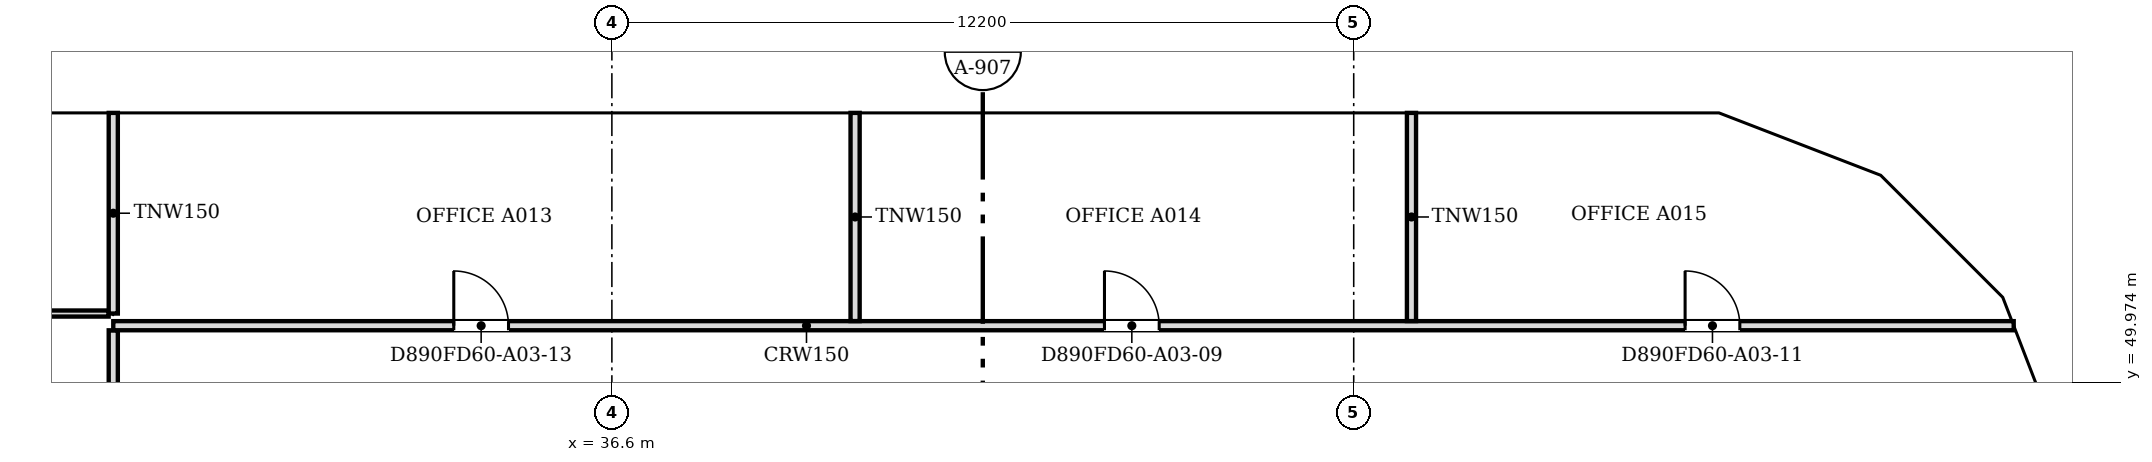
"""IFC4 building model, lengths in metres.
Left out: names, types, materials, properties, quantities, classifications, styles, units other than length and angle.
Written with IfcOpenShell. Run it as: python <this file> out.ifc"""

import sys

from ifc_helpers import new_model, si_unit, direction, frame, frame_2d, origin, place, context, subcontext, project, spatial, polyline, rectangle, outline, extrude, faceted_brep, source, transform, mapped, element, fill, save


model = new_model("IFC4")
c1 = context("Model", 3, precision=1e-05, world=origin(), true_north=direction((0.0, 1.0)))
c2 = subcontext(c1, "Body", "Model", "MODEL_VIEW")
j1 = project(units=[si_unit("LENGTHUNIT", "METRE"), si_unit("PLANEANGLEUNIT", "RADIAN")], contexts=[c1])
p1 = place(None, origin())
s1 = spatial("IfcSite", under=j1, at=p1, CompositionType="ELEMENT")
p2 = place(p1, origin())
s2 = spatial("IfcBuilding", under=s1, at=p2, CompositionType="ELEMENT")
p3 = place(p2, frame((0.0, 0.0, 37.2)))
s3 = spatial("IfcBuildingStorey", under=s2, at=p3, CompositionType="ELEMENT", Elevation=37.2)
m1 = source(origin(), c2, "Body", "Brep", [
    faceted_brep([(0.047, -0.25, 0.0), (2.997, -0.25, 3.8), (0.047, -0.25, 7.6), (0.0, -0.25, 7.541), (0.0, -0.25, 0.059), (0.093, 0.25, 7.54), (2.944, 0.25, 3.868), (2.944, 0.25, 3.732), (0.093, 0.25, 0.06), (2.997, 0.0, 3.8), (0.047, 0.0, 0.0), (0.047, 0.0, 7.6)], [[[0, 1, 2, 3, 4]], [[5, 6, 7, 8]], [[8, 7, 9, 1, 0, 10]], [[6, 5, 11, 2, 1, 9]], [[3, 2, 11]], [[10, 0, 4]], [[8, 10, 4, 3, 11, 5]], [[9, 7, 6]]]),
])
p4 = place(p3, frame((60.767, 48.71, -3.8), z_axis=(0.0, 0.0, 1.0), x_axis=(-0.359901446078, 0.932990326376, 0.0)))
e1 = element("IfcWall", 1, at=p4, inside=s3, PredefinedType="SOLIDWALL", context=c2, shape_type="MappedRepresentation", body=[
    mapped(m1, transform((0.0, 0.0, 0.0), scale=1.0)),
])
m2 = source(origin(), c2, "Body", "SweptSolid", [
    extrude(outline(polyline([(0.247, 0.665), (2.681, 3.8), (0.247, 6.935), (0.247, 0.665)])), frame((0.0, 0.26, 0.0), z_axis=(0.0, -1.0, 0.0), x_axis=(1.0, 0.0, 0.0)), (0.0, 0.0, 1.0), 0.52),
])
p5 = place(p4, origin())
e2 = element("IfcOpeningElement", 2, at=p5, cuts=e1, PredefinedType="OPENING", context=c2, shape_type="MappedRepresentation", body=[
    mapped(m2, transform((0.0, 0.0, 0.0), scale=1.0)),
])
m3 = source(origin(), c2, "Body", "Brep", [
    faceted_brep([(2.944, -0.25, 0.0), (2.997, -0.25, 0.068), (2.997, -0.25, 7.532), (2.944, -0.25, 7.6), (0.0, -0.25, 3.8), (0.053, 0.25, 3.868), (2.891, 0.25, 7.532), (2.891, 0.25, 0.068), (0.053, 0.25, 3.732), (2.944, 0.0, 0.0), (2.944, 0.0, 7.6), (0.0, 0.0, 3.8)], [[[0, 1, 2, 3, 4]], [[5, 6, 7, 8]], [[1, 0, 9]], [[10, 3, 2]], [[6, 5, 11, 4, 3, 10]], [[8, 7, 9, 0, 4, 11]], [[8, 11, 5]], [[1, 9, 7, 6, 10, 2]]]),
])
p6 = place(p3, frame((59.688, 51.506, -3.8), z_axis=(0.0, 0.0, 1.0), x_axis=(-0.707106781187, 0.707106781187, 0.0)))
e3 = element("IfcWall", 3, at=p6, inside=s3, PredefinedType="SOLIDWALL", context=c2, shape_type="MappedRepresentation", body=[
    mapped(m3, transform((0.0, 0.0, 0.0), scale=1.0)),
])
m4 = source(origin(), c2, "Body", "SweptSolid", [
    extrude(outline(polyline([(2.744, 6.934), (0.316, 3.8), (2.744, 0.667), (2.744, 6.934)])), frame((0.0, 0.26, 0.0), z_axis=(0.0, -1.0, 0.0), x_axis=(1.0, 0.0, 0.0)), (0.0, 0.0, 1.0), 0.52),
])
p7 = place(p6, origin())
e4 = element("IfcOpeningElement", 4, at=p7, cuts=e3, PredefinedType="OPENING", context=c2, shape_type="MappedRepresentation", body=[
    mapped(m4, transform((0.0, 0.0, 0.0), scale=1.0)),
])
m5 = source(origin(), c2, "Body", "Brep", [
    faceted_brep([(0.053, -0.25, 0.0), (3.003, -0.25, 3.8), (0.053, -0.25, 7.6), (0.0, -0.25, 7.532), (0.0, -0.25, 0.068), (0.106, 0.25, 7.532), (2.957, 0.25, 3.86), (2.957, 0.25, 3.74), (0.106, 0.25, 0.068), (3.003, 0.0, 3.8), (0.053, 0.0, 0.0), (0.053, 0.0, 7.6)], [[[0, 1, 2, 3, 4]], [[5, 6, 7, 8]], [[8, 7, 9, 1, 0, 10]], [[6, 5, 11, 2, 1, 9]], [[3, 2, 11]], [[10, 0, 4]], [[8, 10, 4, 3, 11, 5]], [[9, 7, 6]]]),
])
p8 = place(p3, frame((57.656, 53.569, -3.8), z_axis=(0.0, 0.0, 1.0), x_axis=(-0.933007896601, 0.359855894603, 0.0)))
e5 = element("IfcWall", 5, at=p8, inside=s3, PredefinedType="SOLIDWALL", context=c2, shape_type="MappedRepresentation", body=[
    mapped(m5, transform((0.0, 0.0, 0.0), scale=1.0)),
])
m6 = source(origin(), c2, "Body", "SweptSolid", [
    extrude(outline(polyline([(0.253, 0.665), (2.687, 3.8), (0.253, 6.935), (0.253, 0.665)])), frame((0.0, 0.26, 0.0), z_axis=(0.0, -1.0, 0.0), x_axis=(1.0, 0.0, 0.0)), (0.0, 0.0, 1.0), 0.52),
])
p9 = place(p8, origin())
e6 = element("IfcOpeningElement", 6, at=p9, cuts=e5, PredefinedType="OPENING", context=c2, shape_type="MappedRepresentation", body=[
    mapped(m6, transform((0.0, 0.0, 0.0), scale=1.0)),
])
m7 = source(origin(), c2, "Body", "Brep", [
    faceted_brep([(3.003, -0.25, 0.0), (6.053, -0.25, 3.8), (3.003, -0.25, 7.6), (0.0, -0.25, 3.8), (0.047, 0.25, 3.859), (3.003, 0.25, 7.6), (6.053, 0.25, 3.8), (3.003, 0.25, 0.0), (0.047, 0.25, 3.741), (0.0, 0.0, 3.8)], [[[0, 1, 2, 3]], [[4, 5, 6, 7, 8]], [[7, 6, 1, 0]], [[6, 5, 2, 1]], [[5, 4, 9, 3, 2]], [[8, 7, 0, 3, 9]], [[8, 9, 4]]]),
])
p10 = place(p3, frame((54.854, 54.65, -3.8), z_axis=(0.0, 0.0, 1.0), x_axis=(-1.0, 0.0, 0.0)))
e7 = element("IfcWall", 7, at=p10, inside=s3, PredefinedType="SOLIDWALL", context=c2, shape_type="MappedRepresentation", body=[
    mapped(m7, transform((0.0, 0.0, 0.0), scale=1.0)),
])
m8 = source(origin(), c2, "Body", "SweptSolid", [
    extrude(outline(polyline([(3.005, 0.401), (5.733, 3.8), (3.005, 7.199), (0.319, 3.8), (3.005, 0.401)])), frame((0.0, 0.26, 0.0), z_axis=(0.0, -1.0, 0.0), x_axis=(1.0, 0.0, 0.0)), (0.0, 0.0, 1.0), 0.52),
])
p11 = place(p10, origin())
e8 = element("IfcOpeningElement", 8, at=p11, cuts=e7, PredefinedType="OPENING", context=c2, shape_type="MappedRepresentation", body=[
    mapped(m8, transform((0.0, 0.0, 0.0), scale=1.0)),
])
m9 = source(origin(), c2, "Body", "SweptSolid", [
    extrude(outline(polyline([(3.05, 0.0), (6.1, 3.8), (3.05, 7.6), (0.0, 3.8), (3.05, 0.0)])), frame((0.0, 0.25, 0.0), z_axis=(0.0, -1.0, 0.0), x_axis=(1.0, 0.0, 0.0)), (0.0, 0.0, 1.0), 0.5),
])
p12 = place(p3, frame((48.8, 54.65, -3.8), z_axis=(0.0, 0.0, 1.0), x_axis=(-1.0, 0.0, 0.0)))
e9 = element("IfcWall", 9, at=p12, inside=s3, PredefinedType="SOLIDWALL", context=c2, shape_type="MappedRepresentation", body=[
    mapped(m9, transform((0.0, 0.0, 0.0), scale=1.0)),
])
m10 = source(origin(), c2, "Body", "SweptSolid", [
    extrude(outline(polyline([(3.05, 0.399), (5.78, 3.8), (3.05, 7.201), (0.321, 3.8), (3.05, 0.399)])), frame((0.0, 0.26, 0.0), z_axis=(0.0, -1.0, 0.0), x_axis=(1.0, 0.0, 0.0)), (0.0, 0.0, 1.0), 0.52),
])
p13 = place(p12, origin())
e10 = element("IfcOpeningElement", 10, at=p13, cuts=e9, PredefinedType="OPENING", context=c2, shape_type="MappedRepresentation", body=[
    mapped(m10, transform((0.0, 0.0, 0.0), scale=1.0)),
])
m11 = source(origin(), c2, "Body", "Brep", [
    faceted_brep([(3.05, -0.25, 0.0), (6.1, -0.25, 3.8), (6.1, -0.25, 3.8), (3.05, -0.25, 7.6), (0.0, -0.25, 3.8), (0.0, 0.25, 3.8), (3.05, 0.25, 7.6), (6.1, 0.25, 3.8), (6.1, 0.25, 3.8), (3.05, 0.25, 0.0)], [[[0, 1, 2, 3, 4]], [[5, 6, 7, 8, 9]], [[9, 8, 1, 0]], [[7, 6, 3, 2]], [[6, 5, 4, 3]], [[5, 9, 0, 4]], [[1, 8, 7, 2]]]),
])
p14 = place(p3, frame((42.7, 54.65, -3.8), z_axis=(0.0, 0.0, 1.0), x_axis=(-1.0, 0.0, 0.0)))
e11 = element("IfcWall", 11, at=p14, inside=s3, PredefinedType="SOLIDWALL", context=c2, shape_type="MappedRepresentation", body=[
    mapped(m11, transform((0.0, 0.0, 0.0), scale=1.0)),
])
p15 = place(p14, origin())
e12 = element("IfcOpeningElement", 12, at=p15, cuts=e11, PredefinedType="OPENING", context=c2, shape_type="MappedRepresentation", body=[
    mapped(m10, transform((0.0, 0.0, 0.0), scale=1.0)),
])
p16 = place(p3, frame((36.6, 54.65, -3.8), z_axis=(0.0, 0.0, 1.0), x_axis=(-1.0, 0.0, 0.0)))
e13 = element("IfcWall", 13, at=p16, inside=s3, PredefinedType="SOLIDWALL", context=c2, shape_type="MappedRepresentation", body=[
    mapped(m9, transform((0.0, 0.0, 0.0), scale=1.0)),
])
p17 = place(p16, origin())
e14 = element("IfcOpeningElement", 14, at=p17, cuts=e13, PredefinedType="OPENING", context=c2, shape_type="MappedRepresentation", body=[
    mapped(m10, transform((0.0, 0.0, 0.0), scale=1.0)),
])
p18 = place(p3, frame((30.5, 54.65, -3.8), z_axis=(0.0, 0.0, 1.0), x_axis=(-1.0, 0.0, 0.0)))
e15 = element("IfcWall", 15, at=p18, inside=s3, PredefinedType="SOLIDWALL", context=c2, shape_type="MappedRepresentation", body=[
    mapped(m9, transform((0.0, 0.0, 0.0), scale=1.0)),
])
p19 = place(p18, origin())
e16 = element("IfcOpeningElement", 16, at=p19, cuts=e15, PredefinedType="OPENING", context=c2, shape_type="MappedRepresentation", body=[
    mapped(m10, transform((0.0, 0.0, 0.0), scale=1.0)),
])
p20 = place(p2, frame((0.0, 0.0, 41.0)))
s4 = spatial("IfcBuildingStorey", under=s2, at=p20, CompositionType="ELEMENT", Elevation=41.0)
m12 = source(origin(), c2, "Body", "Brep", [
    faceted_brep([(2.95, -0.25, 0.0), (3.003, -0.25, 0.068), (3.003, -0.25, 7.532), (2.95, -0.25, 7.6), (0.0, -0.25, 3.8), (0.047, 0.25, 3.86), (2.898, 0.25, 7.532), (2.898, 0.25, 0.068), (0.047, 0.25, 3.74), (2.95, 0.0, 0.0), (2.95, 0.0, 7.6), (0.0, 0.0, 3.8)], [[[0, 1, 2, 3, 4]], [[5, 6, 7, 8]], [[1, 0, 9]], [[10, 3, 2]], [[6, 5, 11, 4, 3, 10]], [[8, 7, 9, 0, 4, 11]], [[8, 11, 5]], [[1, 9, 7, 6, 10, 2]]]),
])
p21 = place(p20, frame((60.75, 48.753, -3.8), z_axis=(0.0, 0.0, 1.0), x_axis=(-0.35992665181, 0.932980602862, 0.0)))
e17 = element("IfcWall", 17, at=p21, inside=s4, PredefinedType="SOLIDWALL", context=c2, shape_type="MappedRepresentation", body=[
    mapped(m12, transform((0.0, 0.0, 0.0), scale=1.0)),
])
m13 = source(origin(), c2, "Body", "SweptSolid", [
    extrude(outline(polyline([(2.75, 6.935), (0.316, 3.8), (2.75, 0.665), (2.75, 6.935)])), frame((0.0, 0.26, 0.0), z_axis=(0.0, -1.0, 0.0), x_axis=(1.0, 0.0, 0.0)), (0.0, 0.0, 1.0), 0.52),
])
p22 = place(p21, origin())
e18 = element("IfcOpeningElement", 18, at=p22, cuts=e17, PredefinedType="OPENING", context=c2, shape_type="MappedRepresentation", body=[
    mapped(m13, transform((0.0, 0.0, 0.0), scale=1.0)),
])
m14 = source(origin(), c2, "Body", "Brep", [
    faceted_brep([(0.053, -0.25, 0.0), (2.997, -0.25, 3.8), (0.053, -0.25, 7.6), (0.0, -0.25, 7.532), (0.0, -0.25, 0.068), (0.106, 0.25, 7.532), (2.944, 0.25, 3.868), (2.944, 0.25, 3.732), (0.106, 0.25, 0.068), (2.997, 0.0, 3.8), (0.053, 0.0, 0.0), (0.053, 0.0, 7.6)], [[[0, 1, 2, 3, 4]], [[5, 6, 7, 8]], [[8, 7, 9, 1, 0, 10]], [[6, 5, 11, 2, 1, 9]], [[3, 2, 11]], [[10, 0, 4]], [[8, 10, 4, 3, 11, 5]], [[9, 7, 6]]]),
])
p23 = place(p20, frame((59.726, 51.469, -3.8), z_axis=(0.0, 0.0, 1.0), x_axis=(-0.707106781187, 0.707106781187, 0.0)))
e19 = element("IfcWall", 19, at=p23, inside=s4, PredefinedType="SOLIDWALL", context=c2, shape_type="MappedRepresentation", body=[
    mapped(m14, transform((0.0, 0.0, 0.0), scale=1.0)),
])
m15 = source(origin(), c2, "Body", "SweptSolid", [
    extrude(outline(polyline([(0.253, 0.666), (2.681, 3.8), (0.253, 6.934), (0.253, 0.666)])), frame((0.0, 0.26, 0.0), z_axis=(0.0, -1.0, 0.0), x_axis=(1.0, 0.0, 0.0)), (0.0, 0.0, 1.0), 0.52),
])
p24 = place(p23, origin())
e20 = element("IfcOpeningElement", 20, at=p24, cuts=e19, PredefinedType="OPENING", context=c2, shape_type="MappedRepresentation", body=[
    mapped(m15, transform((0.0, 0.0, 0.0), scale=1.0)),
])
m16 = source(origin(), c2, "Body", "Brep", [
    faceted_brep([(2.95, -0.25, 0.0), (2.997, -0.25, 0.059), (2.997, -0.25, 7.541), (2.95, -0.25, 7.6), (0.0, -0.25, 3.8), (0.053, 0.25, 3.868), (2.904, 0.25, 7.54), (2.904, 0.25, 0.06), (0.053, 0.25, 3.732), (2.95, 0.0, 0.0), (2.95, 0.0, 7.6), (0.0, 0.0, 3.8)], [[[0, 1, 2, 3, 4]], [[5, 6, 7, 8]], [[1, 0, 9]], [[10, 3, 2]], [[6, 5, 11, 4, 3, 10]], [[8, 7, 9, 0, 4, 11]], [[8, 11, 5]], [[1, 9, 7, 6, 10, 2]]]),
])
p25 = place(p20, frame((57.606, 53.588, -3.8), z_axis=(0.0, 0.0, 1.0), x_axis=(-0.932990326376, 0.359901446078, 0.0)))
e21 = element("IfcWall", 21, at=p25, inside=s4, PredefinedType="SOLIDWALL", context=c2, shape_type="MappedRepresentation", body=[
    mapped(m16, transform((0.0, 0.0, 0.0), scale=1.0)),
])
p26 = place(p25, origin())
e22 = element("IfcOpeningElement", 22, at=p26, cuts=e21, PredefinedType="OPENING", context=c2, shape_type="MappedRepresentation", body=[
    mapped(m13, transform((0.0, 0.0, 0.0), scale=1.0)),
])
m17 = source(origin(), c2, "Body", "Brep", [
    faceted_brep([(0.047, -0.25, 0.0), (3.05, -0.25, 3.8), (0.047, -0.25, 7.6), (0.0, -0.25, 7.54), (0.0, -0.25, 0.06), (0.093, 0.25, 7.541), (3.05, 0.25, 3.8), (0.093, 0.25, 0.059), (0.047, 0.0, 0.0), (0.047, 0.0, 7.6)], [[[0, 1, 2, 3, 4]], [[5, 6, 7]], [[7, 6, 1, 0, 8]], [[6, 5, 9, 2, 1]], [[3, 2, 9]], [[8, 0, 4]], [[7, 8, 4, 3, 9, 5]]]),
])
p27 = place(p20, frame((54.9, 54.65, -3.8), z_axis=(0.0, 0.0, 1.0), x_axis=(-1.0, 0.0, 0.0)))
e23 = element("IfcWall", 23, at=p27, inside=s4, PredefinedType="SOLIDWALL", context=c2, shape_type="MappedRepresentation", body=[
    mapped(m17, transform((0.0, 0.0, 0.0), scale=1.0)),
])
m18 = source(origin(), c2, "Body", "SweptSolid", [
    extrude(outline(polyline([(0.247, 0.656), (2.731, 3.8), (0.247, 6.944), (0.247, 0.656)])), frame((0.0, 0.26, 0.0), z_axis=(0.0, -1.0, 0.0), x_axis=(1.0, 0.0, 0.0)), (0.0, 0.0, 1.0), 0.52),
])
p28 = place(p27, origin())
e24 = element("IfcOpeningElement", 24, at=p28, cuts=e23, PredefinedType="OPENING", context=c2, shape_type="MappedRepresentation", body=[
    mapped(m18, transform((0.0, 0.0, 0.0), scale=1.0)),
])
p29 = place(p20, frame((51.85, 54.65, -3.8), z_axis=(0.0, 0.0, 1.0), x_axis=(-1.0, 0.0, 0.0)))
e25 = element("IfcWall", 25, at=p29, inside=s4, PredefinedType="SOLIDWALL", context=c2, shape_type="MappedRepresentation", body=[
    mapped(m9, transform((0.0, 0.0, 0.0), scale=1.0)),
])
p30 = place(p29, origin())
e26 = element("IfcOpeningElement", 26, at=p30, cuts=e25, PredefinedType="OPENING", context=c2, shape_type="MappedRepresentation", body=[
    mapped(m10, transform((0.0, 0.0, 0.0), scale=1.0)),
])
p31 = place(p20, frame((45.75, 54.65, -3.8), z_axis=(0.0, 0.0, 1.0), x_axis=(-1.0, 0.0, 0.0)))
e27 = element("IfcWall", 27, at=p31, inside=s4, PredefinedType="SOLIDWALL", context=c2, shape_type="MappedRepresentation", body=[
    mapped(m9, transform((0.0, 0.0, 0.0), scale=1.0)),
])
p32 = place(p31, origin())
e28 = element("IfcOpeningElement", 28, at=p32, cuts=e27, PredefinedType="OPENING", context=c2, shape_type="MappedRepresentation", body=[
    mapped(m10, transform((0.0, 0.0, 0.0), scale=1.0)),
])
p33 = place(p20, frame((39.65, 54.65, -3.8), z_axis=(0.0, 0.0, 1.0), x_axis=(-1.0, 0.0, 0.0)))
e29 = element("IfcWall", 29, at=p33, inside=s4, PredefinedType="SOLIDWALL", context=c2, shape_type="MappedRepresentation", body=[
    mapped(m11, transform((0.0, 0.0, 0.0), scale=1.0)),
])
p34 = place(p33, origin())
e30 = element("IfcOpeningElement", 30, at=p34, cuts=e29, PredefinedType="OPENING", context=c2, shape_type="MappedRepresentation", body=[
    mapped(m10, transform((0.0, 0.0, 0.0), scale=1.0)),
])
p35 = place(p20, frame((33.55, 54.65, -3.8), z_axis=(0.0, 0.0, 1.0), x_axis=(-1.0, 0.0, 0.0)))
e31 = element("IfcWall", 31, at=p35, inside=s4, PredefinedType="SOLIDWALL", context=c2, shape_type="MappedRepresentation", body=[
    mapped(m9, transform((0.0, 0.0, 0.0), scale=1.0)),
])
p36 = place(p35, origin())
e32 = element("IfcOpeningElement", 32, at=p36, cuts=e31, PredefinedType="OPENING", context=c2, shape_type="MappedRepresentation", body=[
    mapped(m10, transform((0.0, 0.0, 0.0), scale=1.0)),
])
p37 = place(p20, frame((27.45, 54.65, -3.8), z_axis=(0.0, 0.0, 1.0), x_axis=(-1.0, 0.0, 0.0)))
e33 = element("IfcWall", 33, at=p37, inside=s4, PredefinedType="SOLIDWALL", context=c2, shape_type="MappedRepresentation", body=[
    mapped(m11, transform((0.0, 0.0, 0.0), scale=1.0)),
])
p38 = place(p37, origin())
e34 = element("IfcOpeningElement", 34, at=p38, cuts=e33, PredefinedType="OPENING", context=c2, shape_type="MappedRepresentation", body=[
    mapped(m10, transform((0.0, 0.0, 0.0), scale=1.0)),
])
p39 = place(p3, frame((28.4, 48.176, 0.0), z_axis=(0.0, 0.0, 1.0), x_axis=(0.0, 1.0, 0.0)))
e35 = element("IfcWall", 35, at=p39, inside=s3, PredefinedType="PARTITIONING", context=c2, shape_type="SweptSolid", body=[
    extrude(rectangle(XDim=2.648, YDim=0.15, at=frame_2d((1.324, 0.0))), origin(), (0.0, 0.0, 1.0), 3.067),
])
p40 = place(p3, frame((28.4, 50.9, 0.0), z_axis=(0.0, 0.0, 1.0), x_axis=(1.0, 0.0, 0.0)))
e36 = element("IfcWall", 36, at=p40, inside=s3, PredefinedType="PARTITIONING", context=c2, shape_type="SweptSolid", body=[
    extrude(rectangle(XDim=31.254, YDim=0.15, at=frame_2d((15.627, 0.0))), origin(), (0.0, 0.0, 1.0), 3.067),
])
m19 = source(origin(), c2, "Body", "SweptSolid", [
    extrude(rectangle(XDim=0.9, YDim=2.1, at=frame_2d((0.45, 1.05))), frame((0.0, 0.085, 0.0), z_axis=(0.0, -1.0, 0.0), x_axis=(1.0, 0.0, 0.0)), (0.0, 0.0, 1.0), 0.17),
])
p41 = place(p40, frame((16.301, 0.0, 0.0)))
e37 = element("IfcOpeningElement", 37, at=p41, cuts=e36, PredefinedType="OPENING", context=c2, shape_type="MappedRepresentation", body=[
    mapped(m19, transform((0.0, 0.0, 0.0), scale=1.0)),
])
p42 = place(p40, frame((25.85, 0.0, 0.0)))
e38 = element("IfcOpeningElement", 38, at=p42, cuts=e36, PredefinedType="OPENING", context=c2, shape_type="MappedRepresentation", body=[
    mapped(m19, transform((0.0, 0.0, 0.0), scale=1.0)),
])
p43 = place(p40, frame((5.6, 0.0, 0.0)))
e39 = element("IfcOpeningElement", 39, at=p43, cuts=e36, PredefinedType="OPENING", context=c2, shape_type="MappedRepresentation", body=[
    mapped(m19, transform((0.0, 0.0, 0.0), scale=1.0)),
])
for number, where, z_axis, x_axis in (
    (40, (40.6, 50.976, 0.0), (0.0, 0.0, 1.0), (0.0, 1.0, 0.0)),
    (41, (49.75, 50.976, 0.0), (0.0, 0.0, 1.0), (0.0, 1.0, 0.0)),
):
    element("IfcWall", number, at=place(p3, frame(where, z_axis=z_axis, x_axis=x_axis)), inside=s3, PredefinedType="PARTITIONING", context=c2, shape_type="SweptSolid", body=[
        extrude(rectangle(XDim=3.424, YDim=0.15, at=frame_2d((1.712, 0.0))), origin(), (0.0, 0.0, 1.0), 3.067),
    ])
p44 = place(p3, frame((19.776, 51.1, 0.0), z_axis=(0.0, 0.0, 1.0), x_axis=(1.0, 0.0, 0.0)))
e42 = element("IfcWall", 42, at=p44, inside=s3, PredefinedType="PARTITIONING", context=c2, shape_type="SweptSolid", body=[
    extrude(rectangle(XDim=8.548, YDim=0.1, at=frame_2d((4.274, 0.0))), origin(), (0.0, 0.0, 1.0), 3.067),
])
m20 = source(origin(), c2, "Body", "SweptSolid", [
    extrude(rectangle(XDim=0.9, YDim=2.1, at=frame_2d((0.45, 1.05))), frame((0.0, 0.06, 0.0), z_axis=(0.0, -1.0, 0.0), x_axis=(1.0, 0.0, 0.0)), (0.0, 0.0, 1.0), 0.12),
])
p45 = place(p44, frame((1.6, 0.0, 0.0)))
e43 = element("IfcOpeningElement", 43, at=p45, cuts=e42, PredefinedType="OPENING", context=c2, shape_type="MappedRepresentation", body=[
    mapped(m20, transform((0.0, 0.0, 0.0), scale=1.0)),
])
p46 = place(p44, frame((5.927, 0.0, 0.0)))
e44 = element("IfcOpeningElement", 44, at=p46, cuts=e42, PredefinedType="OPENING", context=c2, shape_type="MappedRepresentation", body=[
    mapped(m20, transform((0.0, 0.0, 0.0), scale=1.0)),
])
p47 = place(p3, frame((28.4, 51.1, 0.0), z_axis=(0.0, 0.0, 1.0), x_axis=(0.0, 1.0, 0.0)))
e45 = element("IfcWall", 45, at=p47, inside=s3, PredefinedType="PARTITIONING", context=c2, shape_type="SweptSolid", body=[
    extrude(rectangle(XDim=3.3, YDim=0.15, at=frame_2d((1.65, 0.0))), origin(), (0.0, 0.0, 1.0), 3.067),
])
m21 = source(origin(), c2, "Body", "SweptSolid", [
    extrude(rectangle(XDim=0.9, YDim=2.1, at=frame_2d((0.45, 1.05))), frame((0.0, 0.025, 0.0), z_axis=(0.0, -1.0, 0.0), x_axis=(1.0, 0.0, 0.0)), (0.0, 0.0, 1.0), 0.05),
])
p48 = place(p41, origin())
e46 = element("IfcDoor", 46, at=p48, inside=s3, OperationType="SINGLE_SWING_LEFT", PredefinedType="DOOR", context=c2, shape_type="MappedRepresentation", body=[
    mapped(m21, transform((0.0, 0.0, 0.0), scale=1.0)),
])
fill(e37, e46)
p49 = place(p42, origin())
e47 = element("IfcDoor", 47, at=p49, inside=s3, OperationType="SINGLE_SWING_LEFT", PredefinedType="DOOR", context=c2, shape_type="MappedRepresentation", body=[
    mapped(m21, transform((0.0, 0.0, 0.0), scale=1.0)),
])
fill(e38, e47)
p50 = place(p43, origin())
e48 = element("IfcDoor", 48, at=p50, inside=s3, OperationType="SINGLE_SWING_LEFT", PredefinedType="DOOR", context=c2, shape_type="MappedRepresentation", body=[
    mapped(m21, transform((0.0, 0.0, 0.0), scale=1.0)),
])
fill(e39, e48)
save(model, sys.argv[1])
